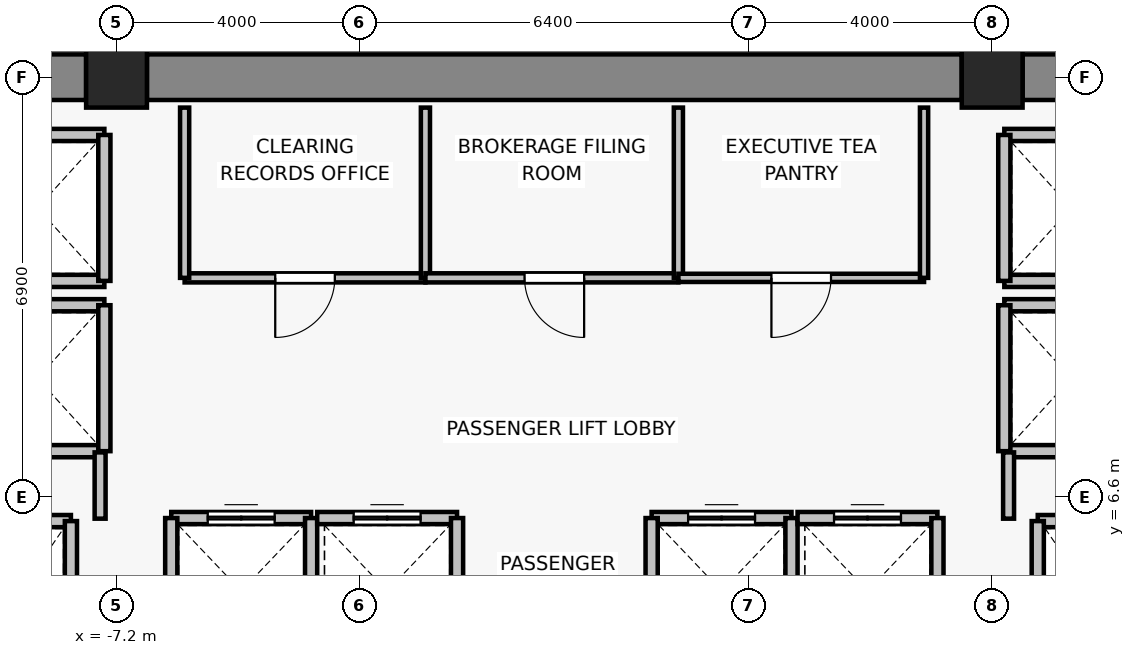
"""IFC4 building model, lengths in metres.
Left out: names, types, materials, properties, quantities, classifications, styles, units other than length and angle.
Written with IfcOpenShell. Run it as: python <this file> out.ifc"""

import sys

from ifc_helpers import new_model, si_unit, direction, frame, frame_2d, origin, origin_2d, place, context, subcontext, project, spatial, rectangle, extrude, source, transform, mapped, element, fill, save


model = new_model("IFC4")
c1 = context("Model", 3, precision=1e-05, world=origin(), true_north=direction((0.0, 1.0)))
c2 = subcontext(c1, "Body", "Model", "MODEL_VIEW")
j1 = project(units=[si_unit("LENGTHUNIT", "METRE"), si_unit("PLANEANGLEUNIT", "RADIAN")], contexts=[c1])
p1 = place(None, origin())
s1 = spatial("IfcSite", under=j1, at=p1, CompositionType="ELEMENT")
p2 = place(p1, origin())
s2 = spatial("IfcBuilding", under=s1, at=p2, CompositionType="ELEMENT")
p3 = place(p2, frame((0.0, 0.0, 192.4)))
s3 = spatial("IfcBuildingStorey", under=s2, at=p3, CompositionType="ELEMENT", Elevation=192.4)
for number, where, z_axis, x_axis in (
    (1, (-7.2, 13.5, 0.0), (0.0, 0.0, 1.0), (1.0, 0.0, 0.0)),
    (2, (7.2, 13.5, 0.0), (0.0, 0.0, 1.0), (1.0, 0.0, 0.0)),
):
    element("IfcColumn", number, at=place(p3, frame(where, z_axis=z_axis, x_axis=x_axis)), inside=s3, PredefinedType="COLUMN", context=c2, shape_type="SweptSolid", body=[
        extrude(rectangle(XDim=1.0, YDim=1.0, at=origin_2d()), origin(), (0.0, 0.0, 1.0), 3.3),
    ])
p4 = place(p3, frame((-13.9, 13.5, 0.0), z_axis=(0.0, 0.0, 1.0), x_axis=(1.0, 0.0, 0.0)))
e3 = element("IfcWall", 3, at=p4, inside=s3, PredefinedType="SHEAR", context=c2, shape_type="SweptSolid", body=[
    extrude(rectangle(XDim=6.2, YDim=0.75, at=frame_2d((3.1, 0.0))), origin(), (0.0, 0.0, 1.0), 3.075),
])
p5 = place(p3, frame((-6.7, 13.5, 0.0), z_axis=(0.0, 0.0, 1.0), x_axis=(1.0, 0.0, 0.0)))
e4 = element("IfcWall", 4, at=p5, inside=s3, PredefinedType="SHEAR", context=c2, shape_type="SweptSolid", body=[
    extrude(rectangle(XDim=13.4, YDim=0.75, at=frame_2d((6.7, 0.0))), origin(), (0.0, 0.0, 1.0), 3.075),
])
p6 = place(p3, frame((7.7, 13.5, 0.0), z_axis=(0.0, 0.0, 1.0), x_axis=(1.0, 0.0, 0.0)))
e5 = element("IfcWall", 5, at=p6, inside=s3, PredefinedType="SHEAR", context=c2, shape_type="SweptSolid", body=[
    extrude(rectangle(XDim=6.2, YDim=0.75, at=frame_2d((3.1, 0.0))), origin(), (0.0, 0.0, 1.0), 3.075),
])
p7 = place(p3, frame((-9.95, 6.2, 0.0), z_axis=(0.0, 0.0, 1.0), x_axis=(1.0, 0.0, 0.0)))
e6 = element("IfcWall", 6, at=p7, inside=s3, PredefinedType="SOLIDWALL", context=c2, shape_type="SweptSolid", body=[
    extrude(rectangle(XDim=2.0, YDim=0.2, at=frame_2d((1.0, 0.0))), origin(), (0.0, 0.0, 1.0), 3.075),
])
p8 = place(p3, frame((-7.95, 6.2, 0.0), z_axis=(0.0, 0.0, 1.0), x_axis=(0.0, -1.0, 0.0)))
e7 = element("IfcWall", 7, at=p8, inside=s3, PredefinedType="SOLIDWALL", context=c2, shape_type="SweptSolid", body=[
    extrude(rectangle(XDim=2.8, YDim=0.2, at=frame_2d((1.4, 0.0))), origin(), (0.0, 0.0, 1.0), 3.075),
])
p9 = place(p3, frame((7.95, 6.2, 0.0), z_axis=(0.0, 0.0, 1.0), x_axis=(1.0, 0.0, 0.0)))
e8 = element("IfcWall", 8, at=p9, inside=s3, PredefinedType="SOLIDWALL", context=c2, shape_type="SweptSolid", body=[
    extrude(rectangle(XDim=2.0, YDim=0.2, at=frame_2d((1.0, 0.0))), origin(), (0.0, 0.0, 1.0), 3.075),
])
p10 = place(p3, frame((7.95, 3.4, 0.0), z_axis=(0.0, 0.0, 1.0), x_axis=(0.0, 1.0, 0.0)))
e9 = element("IfcWall", 9, at=p10, inside=s3, PredefinedType="SOLIDWALL", context=c2, shape_type="SweptSolid", body=[
    extrude(rectangle(XDim=2.8, YDim=0.2, at=frame_2d((1.4, 0.0))), origin(), (0.0, 0.0, 1.0), 3.075),
])
p11 = place(p3, frame((-6.3, 6.25, 0.0), z_axis=(0.0, 0.0, 1.0), x_axis=(1.0, 0.0, 0.0)))
e10 = element("IfcWall", 10, at=p11, inside=s3, PredefinedType="SOLIDWALL", context=c2, shape_type="SweptSolid", body=[
    extrude(rectangle(XDim=2.3, YDim=0.2, at=frame_2d((1.15, 0.0))), origin(), (0.0, 0.0, 1.0), 3.075),
])
p12 = place(p11, frame((0.6, 0.0, 0.0)))
e11 = element("IfcOpeningElement", 11, at=p12, cuts=e10, PredefinedType="OPENING", context=c2, shape_type="SweptSolid", body=[
    extrude(rectangle(XDim=1.1, YDim=2.2, at=frame_2d((0.55, 1.1))), frame((0.0, 0.11, 0.0), z_axis=(0.0, -1.0, 0.0), x_axis=(1.0, 0.0, 0.0)), (0.0, 0.0, 1.0), 0.22),
])
for number, where, z_axis, x_axis in (
    (12, (-6.3, 3.85, 0.0), (0.0, 0.0, 1.0), (0.0, 1.0, 0.0)),
    (13, (-4.0, 6.25, 0.0), (0.0, 0.0, 1.0), (0.0, -1.0, 0.0)),
):
    element("IfcWall", number, at=place(p3, frame(where, z_axis=z_axis, x_axis=x_axis)), inside=s3, PredefinedType="SOLIDWALL", context=c2, shape_type="SweptSolid", body=[
        extrude(rectangle(XDim=2.4, YDim=0.2, at=frame_2d((1.2, 0.0))), origin(), (0.0, 0.0, 1.0), 3.075),
    ])
p13 = place(p3, frame((-3.9, 6.25, 0.0), z_axis=(0.0, 0.0, 1.0), x_axis=(1.0, 0.0, 0.0)))
e14 = element("IfcWall", 14, at=p13, inside=s3, PredefinedType="SOLIDWALL", context=c2, shape_type="SweptSolid", body=[
    extrude(rectangle(XDim=2.3, YDim=0.2, at=frame_2d((1.15, 0.0))), origin(), (0.0, 0.0, 1.0), 3.075),
])
p14 = place(p13, frame((0.6, 0.0, 0.0)))
e15 = element("IfcOpeningElement", 15, at=p14, cuts=e14, PredefinedType="OPENING", context=c2, shape_type="SweptSolid", body=[
    extrude(rectangle(XDim=1.1, YDim=2.2, at=frame_2d((0.55, 1.1))), frame((0.0, 0.11, 0.0), z_axis=(0.0, -1.0, 0.0), x_axis=(1.0, 0.0, 0.0)), (0.0, 0.0, 1.0), 0.22),
])
p15 = place(p3, frame((-1.6, 6.25, 0.0), z_axis=(0.0, 0.0, 1.0), x_axis=(0.0, -1.0, 0.0)))
e16 = element("IfcWall", 16, at=p15, inside=s3, PredefinedType="SOLIDWALL", context=c2, shape_type="SweptSolid", body=[
    extrude(rectangle(XDim=2.4, YDim=0.2, at=frame_2d((1.2, 0.0))), origin(), (0.0, 0.0, 1.0), 3.075),
])
p16 = place(p3, frame((1.6, 6.25, 0.0), z_axis=(0.0, 0.0, 1.0), x_axis=(1.0, 0.0, 0.0)))
e17 = element("IfcWall", 17, at=p16, inside=s3, PredefinedType="SOLIDWALL", context=c2, shape_type="SweptSolid", body=[
    extrude(rectangle(XDim=2.3, YDim=0.2, at=frame_2d((1.15, 0.0))), origin(), (0.0, 0.0, 1.0), 3.075),
])
p17 = place(p16, frame((0.6, 0.0, 0.0)))
e18 = element("IfcOpeningElement", 18, at=p17, cuts=e17, PredefinedType="OPENING", context=c2, shape_type="SweptSolid", body=[
    extrude(rectangle(XDim=1.1, YDim=2.2, at=frame_2d((0.55, 1.1))), frame((0.0, 0.11, 0.0), z_axis=(0.0, -1.0, 0.0), x_axis=(1.0, 0.0, 0.0)), (0.0, 0.0, 1.0), 0.22),
])
for number, where, z_axis, x_axis in (
    (19, (1.6, 3.85, 0.0), (0.0, 0.0, 1.0), (0.0, 1.0, 0.0)),
    (20, (3.9, 6.25, 0.0), (0.0, 0.0, 1.0), (0.0, -1.0, 0.0)),
):
    element("IfcWall", number, at=place(p3, frame(where, z_axis=z_axis, x_axis=x_axis)), inside=s3, PredefinedType="SOLIDWALL", context=c2, shape_type="SweptSolid", body=[
        extrude(rectangle(XDim=2.4, YDim=0.2, at=frame_2d((1.2, 0.0))), origin(), (0.0, 0.0, 1.0), 3.075),
    ])
p18 = place(p3, frame((4.0, 6.25, 0.0), z_axis=(0.0, 0.0, 1.0), x_axis=(1.0, 0.0, 0.0)))
e21 = element("IfcWall", 21, at=p18, inside=s3, PredefinedType="SOLIDWALL", context=c2, shape_type="SweptSolid", body=[
    extrude(rectangle(XDim=2.3, YDim=0.2, at=frame_2d((1.15, 0.0))), origin(), (0.0, 0.0, 1.0), 3.075),
])
p19 = place(p18, frame((0.6, 0.0, 0.0)))
e22 = element("IfcOpeningElement", 22, at=p19, cuts=e21, PredefinedType="OPENING", context=c2, shape_type="SweptSolid", body=[
    extrude(rectangle(XDim=1.1, YDim=2.2, at=frame_2d((0.55, 1.1))), frame((0.0, 0.11, 0.0), z_axis=(0.0, -1.0, 0.0), x_axis=(1.0, 0.0, 0.0)), (0.0, 0.0, 1.0), 0.22),
])
p20 = place(p3, frame((6.3, 6.25, 0.0), z_axis=(0.0, 0.0, 1.0), x_axis=(0.0, -1.0, 0.0)))
e23 = element("IfcWall", 23, at=p20, inside=s3, PredefinedType="SOLIDWALL", context=c2, shape_type="SweptSolid", body=[
    extrude(rectangle(XDim=2.4, YDim=0.2, at=frame_2d((1.2, 0.0))), origin(), (0.0, 0.0, 1.0), 3.075),
])
for number, where, z_axis, x_axis in (
    (24, (-7.4, 7.35, 0.0), (0.0, 0.0, 1.0), (-1.0, 0.0, 0.0)),
    (25, (-9.6, 9.75, 0.0), (0.0, 0.0, 1.0), (1.0, 0.0, 0.0)),
):
    element("IfcWall", number, at=place(p3, frame(where, z_axis=z_axis, x_axis=x_axis)), inside=s3, PredefinedType="SOLIDWALL", context=c2, shape_type="SweptSolid", body=[
        extrude(rectangle(XDim=2.2, YDim=0.2, at=frame_2d((1.1, 0.0))), origin(), (0.0, 0.0, 1.0), 2.565),
    ])
p21 = place(p3, frame((-7.4, 9.75, 0.0), z_axis=(0.0, 0.0, 1.0), x_axis=(0.0, -1.0, 0.0)))
e26 = element("IfcWall", 26, at=p21, inside=s3, PredefinedType="SOLIDWALL", context=c2, shape_type="SweptSolid", body=[
    extrude(rectangle(XDim=2.4, YDim=0.2, at=frame_2d((1.2, 0.0))), origin(), (0.0, 0.0, 1.0), 2.565),
])
for number, where, z_axis, x_axis in (
    (27, (-7.4, 10.15, 0.0), (0.0, 0.0, 1.0), (-1.0, 0.0, 0.0)),
    (28, (-9.6, 12.55, 0.0), (0.0, 0.0, 1.0), (1.0, 0.0, 0.0)),
):
    element("IfcWall", number, at=place(p3, frame(where, z_axis=z_axis, x_axis=x_axis)), inside=s3, PredefinedType="SOLIDWALL", context=c2, shape_type="SweptSolid", body=[
        extrude(rectangle(XDim=2.2, YDim=0.2, at=frame_2d((1.1, 0.0))), origin(), (0.0, 0.0, 1.0), 2.565),
    ])
p22 = place(p3, frame((-7.4, 12.55, 0.0), z_axis=(0.0, 0.0, 1.0), x_axis=(0.0, -1.0, 0.0)))
e29 = element("IfcWall", 29, at=p22, inside=s3, PredefinedType="SOLIDWALL", context=c2, shape_type="SweptSolid", body=[
    extrude(rectangle(XDim=2.4, YDim=0.2, at=frame_2d((1.2, 0.0))), origin(), (0.0, 0.0, 1.0), 2.565),
])
for number, where, z_axis, x_axis in (
    (30, (9.6, 7.35, 0.0), (0.0, 0.0, 1.0), (-1.0, 0.0, 0.0)),
    (31, (7.4, 9.75, 0.0), (0.0, 0.0, 1.0), (1.0, 0.0, 0.0)),
):
    element("IfcWall", number, at=place(p3, frame(where, z_axis=z_axis, x_axis=x_axis)), inside=s3, PredefinedType="SOLIDWALL", context=c2, shape_type="SweptSolid", body=[
        extrude(rectangle(XDim=2.2, YDim=0.2, at=frame_2d((1.1, 0.0))), origin(), (0.0, 0.0, 1.0), 2.565),
    ])
p23 = place(p3, frame((7.4, 7.35, 0.0), z_axis=(0.0, 0.0, 1.0), x_axis=(0.0, 1.0, 0.0)))
e32 = element("IfcWall", 32, at=p23, inside=s3, PredefinedType="SOLIDWALL", context=c2, shape_type="SweptSolid", body=[
    extrude(rectangle(XDim=2.4, YDim=0.2, at=frame_2d((1.2, 0.0))), origin(), (0.0, 0.0, 1.0), 2.565),
])
for number, where, z_axis, x_axis in (
    (33, (9.6, 10.15, 0.0), (0.0, 0.0, 1.0), (-1.0, 0.0, 0.0)),
    (34, (7.4, 12.55, 0.0), (0.0, 0.0, 1.0), (1.0, 0.0, 0.0)),
):
    element("IfcWall", number, at=place(p3, frame(where, z_axis=z_axis, x_axis=x_axis)), inside=s3, PredefinedType="SOLIDWALL", context=c2, shape_type="SweptSolid", body=[
        extrude(rectangle(XDim=2.2, YDim=0.2, at=frame_2d((1.1, 0.0))), origin(), (0.0, 0.0, 1.0), 2.565),
    ])
p24 = place(p3, frame((7.4, 10.15, 0.0), z_axis=(0.0, 0.0, 1.0), x_axis=(0.0, 1.0, 0.0)))
e35 = element("IfcWall", 35, at=p24, inside=s3, PredefinedType="SOLIDWALL", context=c2, shape_type="SweptSolid", body=[
    extrude(rectangle(XDim=2.4, YDim=0.2, at=frame_2d((1.2, 0.0))), origin(), (0.0, 0.0, 1.0), 2.565),
])
for number, where, z_axis, x_axis in (
    (36, (-7.47, 7.33, 0.0), (0.0, 0.0, 1.0), (0.0, -1.0, 0.0)),
    (37, (7.47, 6.24, 0.0), (0.0, 0.0, 1.0), (0.0, 1.0, 0.0)),
):
    element("IfcWall", number, at=place(p3, frame(where, z_axis=z_axis, x_axis=x_axis)), inside=s3, PredefinedType="PARTITIONING", context=c2, shape_type="SweptSolid", body=[
        extrude(rectangle(XDim=1.09, YDim=0.18, at=frame_2d((0.545, 0.0))), origin(), (0.0, 0.0, 1.0), 2.565),
    ])
p25 = place(p3, frame((-2.12, 10.2, 0.0), z_axis=(0.0, 0.0, 1.0), x_axis=(-1.0, 0.0, 0.0)))
e38 = element("IfcWall", 38, at=p25, inside=s3, PredefinedType="PARTITIONING", context=c2, shape_type="SweptSolid", body=[
    extrude(rectangle(XDim=3.96, YDim=0.15, at=frame_2d((1.98, 0.0))), origin(), (0.0, 0.0, 1.0), 3.075),
])
p26 = place(p25, frame((1.49, 0.0, 0.0)))
e39 = element("IfcOpeningElement", 39, at=p26, cuts=e38, PredefinedType="OPENING", context=c2, shape_type="SweptSolid", body=[
    extrude(rectangle(XDim=0.98, YDim=2.15, at=frame_2d((0.49, 1.075))), frame((0.0, 0.085, 0.0), z_axis=(0.0, -1.0, 0.0), x_axis=(1.0, 0.0, 0.0)), (0.0, 0.0, 1.0), 0.17),
])
for number, where, z_axis, x_axis in (
    (40, (-6.08, 10.2, 0.0), (0.0, 0.0, 1.0), (0.0, 1.0, 0.0)),
    (41, (-2.12, 13.0, 0.0), (0.0, 0.0, 1.0), (0.0, -1.0, 0.0)),
):
    element("IfcWall", number, at=place(p3, frame(where, z_axis=z_axis, x_axis=x_axis)), inside=s3, PredefinedType="PARTITIONING", context=c2, shape_type="SweptSolid", body=[
        extrude(rectangle(XDim=2.8, YDim=0.15, at=frame_2d((1.4, 0.0))), origin(), (0.0, 0.0, 1.0), 3.075),
    ])
p27 = place(p3, frame((2.04, 10.2, 0.0), z_axis=(0.0, 0.0, 1.0), x_axis=(-1.0, 0.0, 0.0)))
e42 = element("IfcWall", 42, at=p27, inside=s3, PredefinedType="PARTITIONING", context=c2, shape_type="SweptSolid", body=[
    extrude(rectangle(XDim=4.16, YDim=0.15, at=frame_2d((2.08, 0.0))), origin(), (0.0, 0.0, 1.0), 3.075),
])
p28 = place(p27, frame((1.55, 0.0, 0.0)))
e43 = element("IfcOpeningElement", 43, at=p28, cuts=e42, PredefinedType="OPENING", context=c2, shape_type="SweptSolid", body=[
    extrude(rectangle(XDim=0.98, YDim=2.15, at=frame_2d((0.49, 1.075))), frame((0.0, 0.085, 0.0), z_axis=(0.0, -1.0, 0.0), x_axis=(1.0, 0.0, 0.0)), (0.0, 0.0, 1.0), 0.17),
])
p29 = place(p3, frame((2.04, 13.0, 0.0), z_axis=(0.0, 0.0, 1.0), x_axis=(0.0, -1.0, 0.0)))
e44 = element("IfcWall", 44, at=p29, inside=s3, PredefinedType="PARTITIONING", context=c2, shape_type="SweptSolid", body=[
    extrude(rectangle(XDim=2.8, YDim=0.15, at=frame_2d((1.4, 0.0))), origin(), (0.0, 0.0, 1.0), 3.075),
])
p30 = place(p3, frame((6.08, 10.2, 0.0), z_axis=(0.0, 0.0, 1.0), x_axis=(-1.0, 0.0, 0.0)))
e45 = element("IfcWall", 45, at=p30, inside=s3, PredefinedType="PARTITIONING", context=c2, shape_type="SweptSolid", body=[
    extrude(rectangle(XDim=4.04, YDim=0.135, at=frame_2d((2.02, 0.0))), origin(), (0.0, 0.0, 1.0), 3.075),
])
p31 = place(p30, frame((1.53, 0.0, 0.0)))
e46 = element("IfcOpeningElement", 46, at=p31, cuts=e45, PredefinedType="OPENING", context=c2, shape_type="SweptSolid", body=[
    extrude(rectangle(XDim=0.98, YDim=2.15, at=frame_2d((0.49, 1.075))), frame((0.0, 0.077, 0.0), z_axis=(0.0, -1.0, 0.0), x_axis=(1.0, 0.0, 0.0)), (0.0, 0.0, 1.0), 0.155),
])
p32 = place(p3, frame((6.08, 13.0, 0.0), z_axis=(0.0, 0.0, 1.0), x_axis=(0.0, -1.0, 0.0)))
e47 = element("IfcWall", 47, at=p32, inside=s3, PredefinedType="PARTITIONING", context=c2, shape_type="SweptSolid", body=[
    extrude(rectangle(XDim=2.8, YDim=0.135, at=frame_2d((1.4, 0.0))), origin(), (0.0, 0.0, 1.0), 3.075),
])
m1 = source(origin(), c2, "Body", "SweptSolid", [
    extrude(rectangle(XDim=1.1, YDim=2.2, at=frame_2d((0.55, 1.1))), frame((0.0, 0.025, 0.0), z_axis=(0.0, -1.0, 0.0), x_axis=(1.0, 0.0, 0.0)), (0.0, 0.0, 1.0), 0.05),
])
p33 = place(p12, origin())
e48 = element("IfcDoor", 48, at=p33, inside=s3, OperationType="DOUBLE_DOOR_SLIDING", PredefinedType="DOOR", context=c2, shape_type="MappedRepresentation", body=[
    mapped(m1, transform((0.0, 0.0, 0.0), x_axis=(1.0, 0.0, 0.0), y_axis=(0.0, 1.0, 0.0), z_axis=(0.0, 0.0, 1.0), scale=1.0)),
])
fill(e11, e48)
p34 = place(p14, origin())
e49 = element("IfcDoor", 49, at=p34, inside=s3, OperationType="DOUBLE_DOOR_SLIDING", PredefinedType="DOOR", context=c2, shape_type="MappedRepresentation", body=[
    mapped(m1, transform((0.0, 0.0, 0.0), x_axis=(1.0, 0.0, 0.0), y_axis=(0.0, 1.0, 0.0), z_axis=(0.0, 0.0, 1.0), scale=1.0)),
])
fill(e15, e49)
p35 = place(p17, origin())
e50 = element("IfcDoor", 50, at=p35, inside=s3, OperationType="DOUBLE_DOOR_SLIDING", PredefinedType="DOOR", context=c2, shape_type="MappedRepresentation", body=[
    mapped(m1, transform((0.0, 0.0, 0.0), x_axis=(1.0, 0.0, 0.0), y_axis=(0.0, 1.0, 0.0), z_axis=(0.0, 0.0, 1.0), scale=1.0)),
])
fill(e18, e50)
p36 = place(p19, origin())
e51 = element("IfcDoor", 51, at=p36, inside=s3, OperationType="DOUBLE_DOOR_SLIDING", PredefinedType="DOOR", context=c2, shape_type="MappedRepresentation", body=[
    mapped(m1, transform((0.0, 0.0, 0.0), x_axis=(1.0, 0.0, 0.0), y_axis=(0.0, 1.0, 0.0), z_axis=(0.0, 0.0, 1.0), scale=1.0)),
])
fill(e22, e51)
m2 = source(origin(), c2, "Body", "SweptSolid", [
    extrude(rectangle(XDim=0.98, YDim=2.15, at=frame_2d((0.49, 1.075))), frame((0.0, 0.025, 0.0), z_axis=(0.0, -1.0, 0.0), x_axis=(1.0, 0.0, 0.0)), (0.0, 0.0, 1.0), 0.05),
])
p37 = place(p26, origin())
e52 = element("IfcDoor", 52, at=p37, inside=s3, OperationType="SINGLE_SWING_RIGHT", PredefinedType="DOOR", context=c2, shape_type="MappedRepresentation", body=[
    mapped(m2, transform((0.0, 0.0, 0.0), x_axis=(1.0, 0.0, 0.0), y_axis=(0.0, 1.0, 0.0), z_axis=(0.0, 0.0, 1.0), scale=1.0)),
])
fill(e39, e52)
p38 = place(p28, origin())
e53 = element("IfcDoor", 53, at=p38, inside=s3, OperationType="SINGLE_SWING_LEFT", PredefinedType="DOOR", context=c2, shape_type="MappedRepresentation", body=[
    mapped(m2, transform((0.0, 0.0, 0.0), x_axis=(1.0, 0.0, 0.0), y_axis=(0.0, 1.0, 0.0), z_axis=(0.0, 0.0, 1.0), scale=1.0)),
])
fill(e43, e53)
p39 = place(p31, origin())
e54 = element("IfcDoor", 54, at=p39, inside=s3, OperationType="SINGLE_SWING_RIGHT", PredefinedType="DOOR", context=c2, shape_type="MappedRepresentation", body=[
    mapped(m2, transform((0.0, 0.0, 0.0), x_axis=(1.0, 0.0, 0.0), y_axis=(0.0, 1.0, 0.0), z_axis=(0.0, 0.0, 1.0), scale=1.0)),
])
fill(e46, e54)
save(model, sys.argv[1])
